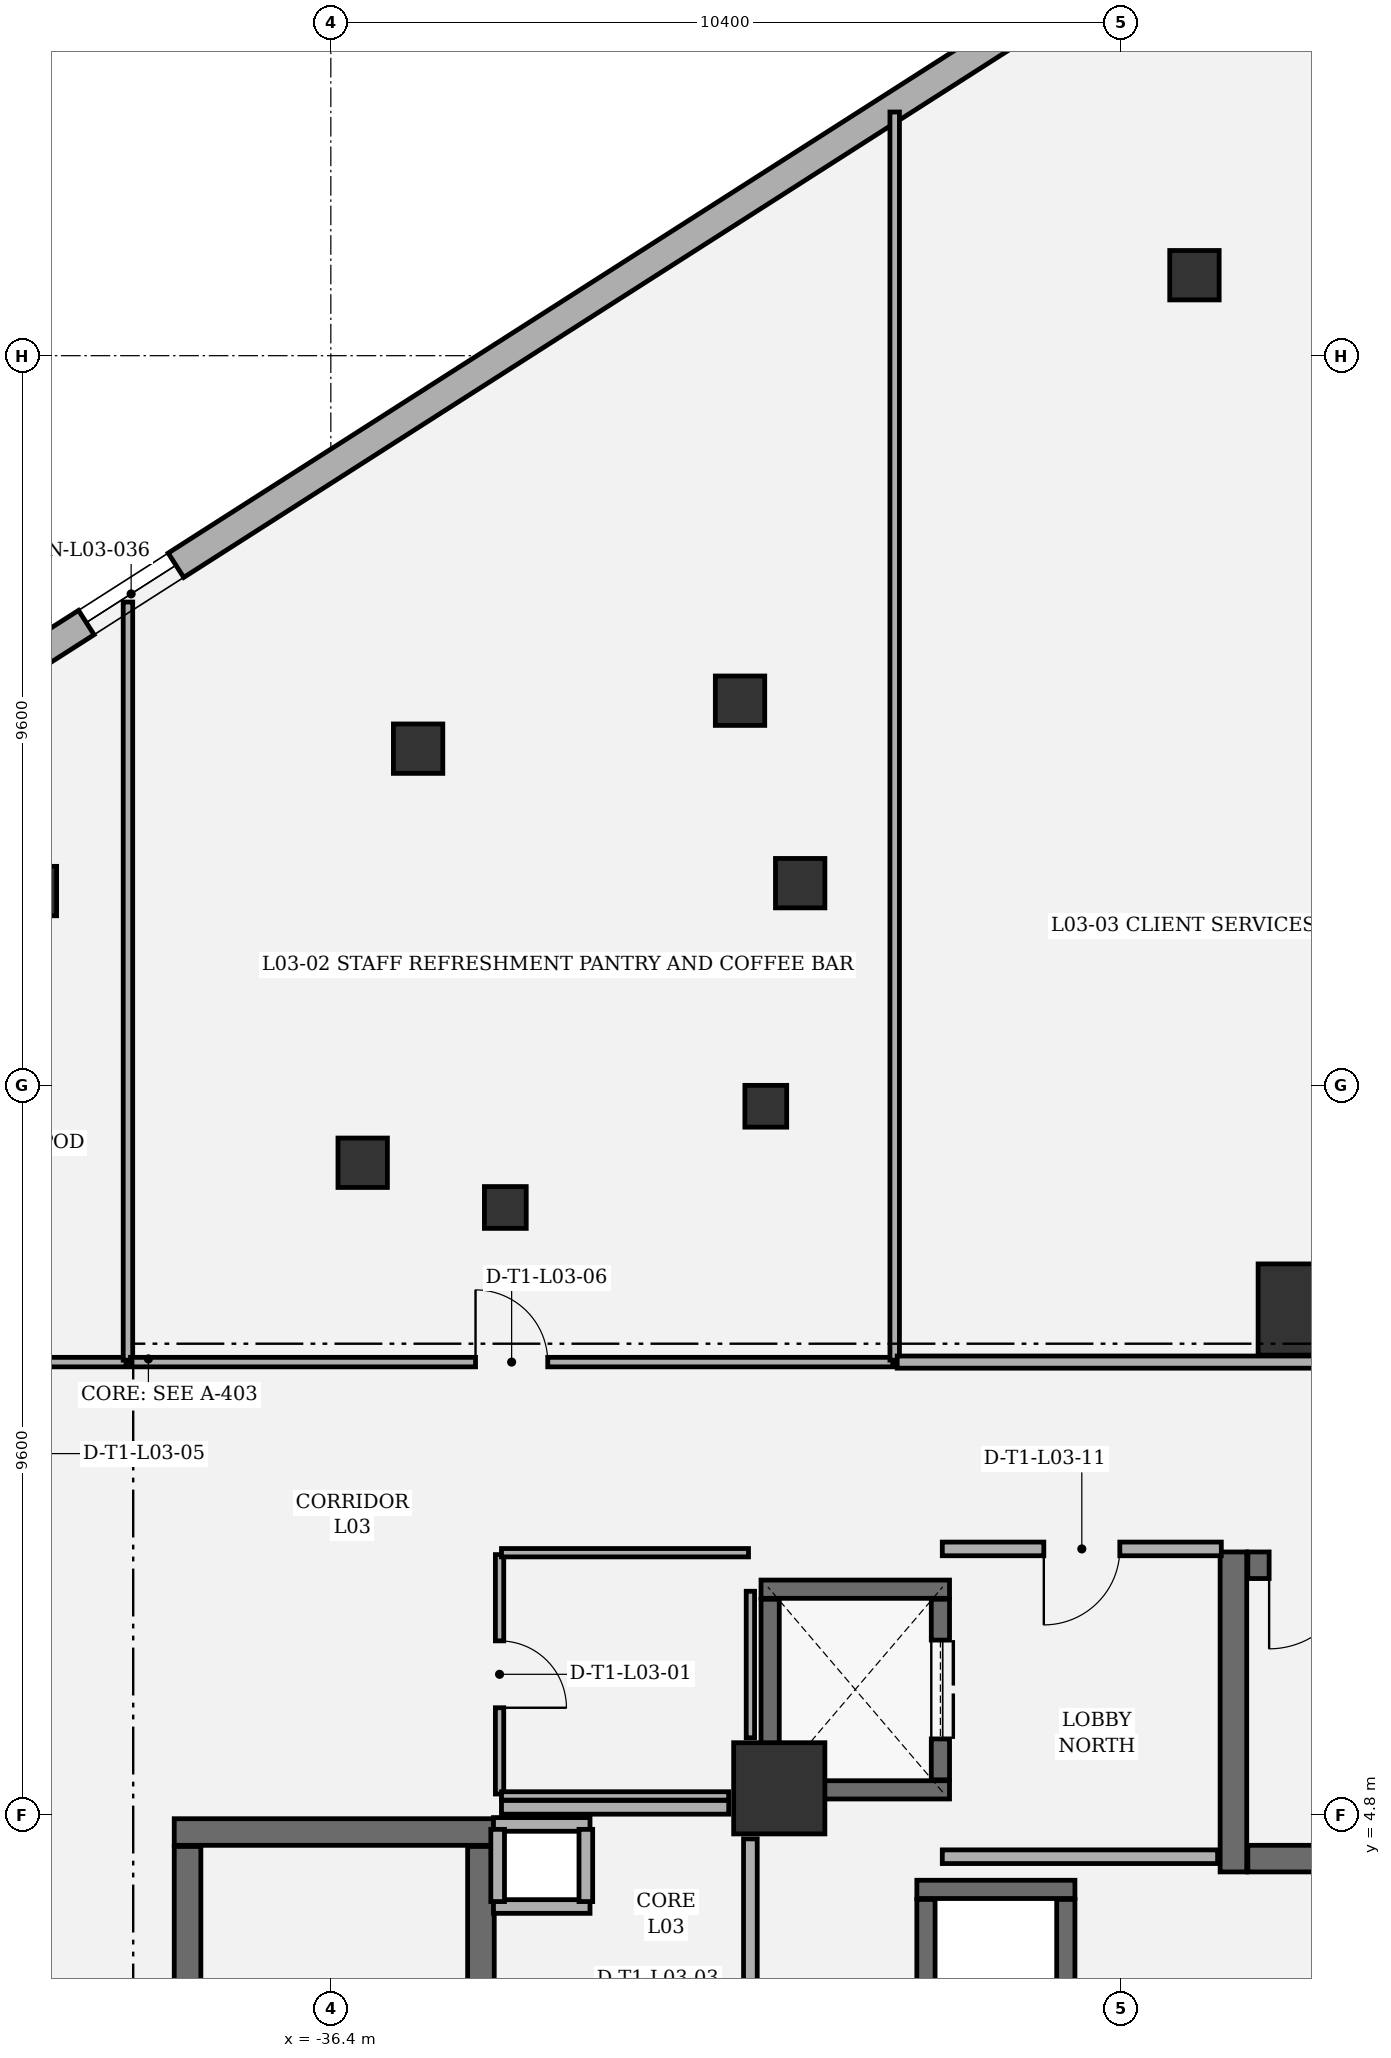
"""IFC4 building model, lengths in metres.
Left out: names, types, materials, properties, quantities, classifications, styles, units other than length and angle.
Written with IfcOpenShell. Run it as: python <this file> out.ifc"""

import sys

from ifc_helpers import new_model, si_unit, direction, frame, frame_2d, origin, origin_2d, place, context, subcontext, project, spatial, rectangle, extrude, element, fill, save


model = new_model("IFC4")
c1 = context("Model", 3, precision=1e-05, world=origin(), true_north=direction((0.0, 1.0)))
c2 = subcontext(c1, "Body", "Model", "MODEL_VIEW")
j1 = project(units=[si_unit("LENGTHUNIT", "METRE"), si_unit("PLANEANGLEUNIT", "RADIAN")], contexts=[c1])
p1 = place(None, origin())
s1 = spatial("IfcSite", under=j1, at=p1, CompositionType="ELEMENT")
p2 = place(p1, origin())
s2 = spatial("IfcBuilding", under=s1, at=p2, CompositionType="ELEMENT")
p3 = place(p2, frame((0.0, 0.0, 17.0)))
s3 = spatial("IfcBuildingStorey", under=s2, at=p3, CompositionType="ELEMENT", Elevation=17.0)
for number, where, z_axis, x_axis in (
    (1, (-23.6, 11.45, 0.0), (0.0, 0.0, 1.0), (1.0, 0.0, 0.0)),
    (2, (-30.5, 5.15, 0.0), (0.0, 0.0, 1.0), (1.0, 0.0, 0.0)),
):
    element("IfcColumn", number, at=place(p3, frame(where, z_axis=z_axis, x_axis=x_axis)), inside=s3, PredefinedType="COLUMN", context=c2, shape_type="SweptSolid", body=[
        extrude(rectangle(XDim=1.2, YDim=1.2, at=origin_2d()), origin(), (0.0, 0.0, 1.0), 5.0),
    ])
for number, where, z_axis, x_axis in (
    (3, (-40.333, 16.956, 0.0), (0.0, 0.0, 1.0), (1.0, 0.0, 0.0)),
    (4, (-35.252, 18.829, 0.0), (0.0, 0.0, 1.0), (1.0, 0.0, 0.0)),
    (5, (-25.038, 25.059, 0.0), (0.0, 0.0, 1.0), (1.0, 0.0, 0.0)),
    (6, (-31.016, 19.46, 0.0), (0.0, 0.0, 1.0), (1.0, 0.0, 0.0)),
    (7, (-35.981, 13.381, 0.0), (0.0, 0.0, 1.0), (1.0, 0.0, 0.0)),
    (8, (-30.225, 17.06, 0.0), (0.0, 0.0, 1.0), (1.0, 0.0, 0.0)),
):
    element("IfcColumn", number, at=place(p3, frame(where, z_axis=z_axis, x_axis=x_axis)), inside=s3, PredefinedType="COLUMN", context=c2, shape_type="SweptSolid", body=[
        extrude(rectangle(XDim=0.65, YDim=0.65, at=origin_2d()), origin(), (0.0, 0.0, 1.0), 5.0),
    ])
for number, where, z_axis, x_axis in (
    (9, (-34.104, 12.792, 0.0), (0.0, 0.0, 1.0), (1.0, 0.0, 0.0)),
    (10, (-30.677, 14.124, 0.0), (0.0, 0.0, 1.0), (1.0, 0.0, 0.0)),
):
    element("IfcColumn", number, at=place(p3, frame(where, z_axis=z_axis, x_axis=x_axis)), inside=s3, PredefinedType="COLUMN", context=c2, shape_type="SweptSolid", body=[
        extrude(rectangle(XDim=0.55, YDim=0.55, at=origin_2d()), origin(), (0.0, 0.0, 1.0), 5.0),
    ])
p4 = place(p3, frame((-64.419, 4.637, 0.0), z_axis=(0.0, 0.0, 1.0), x_axis=(0.842602364841, 0.538536214905, 0.0)))
e11 = element("IfcWall", 11, at=p4, inside=s3, PredefinedType="SOLIDWALL", context=c2, shape_type="SweptSolid", body=[
    extrude(rectangle(XDim=60.27, YDim=0.38, at=frame_2d((30.135, 0.0))), origin(), (0.0, 0.0, 1.0), 4.74),
])
p5 = place(p4, frame((29.435, 0.0, 0.8)))
e12 = element("IfcOpeningElement", 12, at=p5, cuts=e11, PredefinedType="OPENING", context=c2, shape_type="SweptSolid", body=[
    extrude(rectangle(XDim=1.4, YDim=1.5, at=frame_2d((0.7, 0.75))), frame((0.0, 0.2, 0.0), z_axis=(0.0, -1.0, 0.0), x_axis=(1.0, 0.0, 0.0)), (0.0, 0.0, 1.0), 0.4),
])
p6 = place(p3, frame((-24.525, 8.26, 0.0), z_axis=(0.0, 0.0, 1.0), x_axis=(0.0, -1.0, 0.0)))
e13 = element("IfcWall", 13, at=p6, inside=s3, PredefinedType="SHEAR", context=c2, shape_type="SweptSolid", body=[
    extrude(rectangle(XDim=4.21, YDim=0.35, at=frame_2d((2.105, 0.0))), origin(), (0.0, 0.0, 1.0), 4.74),
])
p7 = place(p3, frame((-24.335, 4.225, 0.0), z_axis=(0.0, 0.0, 1.0), x_axis=(1.0, 0.0, 0.0)))
e14 = element("IfcWall", 14, at=p7, inside=s3, PredefinedType="SHEAR", context=c2, shape_type="SweptSolid", body=[
    extrude(rectangle(XDim=8.12, YDim=0.35, at=frame_2d((4.06, 0.0))), origin(), (0.0, 0.0, 1.0), 4.74),
])
p8 = place(p3, frame((-16.215, 8.085, 0.0), z_axis=(0.0, 0.0, 1.0), x_axis=(-1.0, 0.0, 0.0)))
e15 = element("IfcWall", 15, at=p8, inside=s3, PredefinedType="SHEAR", context=c2, shape_type="SweptSolid", body=[
    extrude(rectangle(XDim=8.12, YDim=0.35, at=frame_2d((4.06, 0.0))), origin(), (0.0, 0.0, 1.0), 4.74),
])
p9 = place(p8, frame((6.74, 0.0, 0.0)))
e16 = element("IfcOpeningElement", 16, at=p9, cuts=e15, PredefinedType="OPENING", context=c2, shape_type="SweptSolid", body=[
    extrude(rectangle(XDim=1.1, YDim=2.2, at=frame_2d((0.55, 1.1))), frame((0.0, 0.185, 0.0), z_axis=(0.0, -1.0, 0.0), x_axis=(1.0, 0.0, 0.0)), (0.0, 0.0, 1.0), 0.37),
])
p10 = place(p3, frame((-34.25, 4.575, 0.0), z_axis=(0.0, 0.0, 1.0), x_axis=(-1.0, 0.0, 0.0)))
e17 = element("IfcWall", 17, at=p10, inside=s3, PredefinedType="SHEAR", context=c2, shape_type="SweptSolid", body=[
    extrude(rectangle(XDim=4.21, YDim=0.35, at=frame_2d((2.105, 0.0))), origin(), (0.0, 0.0, 1.0), 4.74),
])
for number, where, z_axis, x_axis in (
    (18, (-34.425, -4.385, 0.0), (0.0, 0.0, 1.0), (0.0, 1.0, 0.0)),
    (19, (-38.285, 4.385, 0.0), (0.0, 0.0, 1.0), (0.0, -1.0, 0.0)),
):
    element("IfcWall", number, at=place(p3, frame(where, z_axis=z_axis, x_axis=x_axis)), inside=s3, PredefinedType="SHEAR", context=c2, shape_type="SweptSolid", body=[
        extrude(rectangle(XDim=8.77, YDim=0.35, at=frame_2d((4.385, 0.0))), origin(), (0.0, 0.0, 1.0), 4.74),
    ])
for number, where, z_axis, x_axis in (
    (20, (-28.26, 5.13, 0.0), (0.0, 0.0, 1.0), (-1.0, 0.0, 0.0)),
    (21, (-30.74, 7.77, 0.0), (0.0, 0.0, 1.0), (1.0, 0.0, 0.0)),
):
    element("IfcWall", number, at=place(p3, frame(where, z_axis=z_axis, x_axis=x_axis)), inside=s3, PredefinedType="SHEAR", context=c2, shape_type="SweptSolid", body=[
        extrude(rectangle(XDim=2.48, YDim=0.24, at=frame_2d((1.24, 0.0))), origin(), (0.0, 0.0, 1.0), 4.74),
    ])
p11 = place(p3, frame((-30.62, 5.262, 0.0), z_axis=(0.0, 0.0, 1.0), x_axis=(0.0, 1.0, 0.0)))
e22 = element("IfcWall", 22, at=p11, inside=s3, PredefinedType="SHEAR", context=c2, shape_type="SweptSolid", body=[
    extrude(rectangle(XDim=2.376, YDim=0.24, at=frame_2d((1.188, 0.0))), origin(), (0.0, 0.0, 1.0), 4.74),
])
p12 = place(p3, frame((-28.38, 7.638, 0.0), z_axis=(0.0, 0.0, 1.0), x_axis=(0.0, -1.0, 0.0)))
e23 = element("IfcWall", 23, at=p12, inside=s3, PredefinedType="SHEAR", context=c2, shape_type="SweptSolid", body=[
    extrude(rectangle(XDim=2.376, YDim=0.24, at=frame_2d((1.188, 0.0))), origin(), (0.0, 0.0, 1.0), 4.74),
])
p13 = place(p12, frame((0.538, 0.0, 0.0)))
e24 = element("IfcOpeningElement", 24, at=p13, cuts=e23, PredefinedType="OPENING", context=c2, shape_type="SweptSolid", body=[
    extrude(rectangle(XDim=1.3, YDim=2.3, at=frame_2d((0.65, 1.15))), frame((0.0, 0.13, 0.0), z_axis=(0.0, -1.0, 0.0), x_axis=(1.0, 0.0, 0.0)), (0.0, 0.0, 1.0), 0.26),
])
p14 = place(p3, frame((-28.69, 3.82, 0.0), z_axis=(0.0, 0.0, 1.0), x_axis=(1.0, 0.0, 0.0)))
e25 = element("IfcWall", 25, at=p14, inside=s3, PredefinedType="SHEAR", context=c2, shape_type="SweptSolid", body=[
    extrude(rectangle(XDim=2.08, YDim=0.24, at=frame_2d((1.04, 0.0))), origin(), (0.0, 0.0, 1.0), 4.74),
])
for number, where, z_axis, x_axis in (
    (26, (-28.57, 1.562, 0.0), (0.0, 0.0, 1.0), (0.0, 1.0, 0.0)),
    (27, (-26.73, 3.688, 0.0), (0.0, 0.0, 1.0), (0.0, -1.0, 0.0)),
):
    element("IfcWall", number, at=place(p3, frame(where, z_axis=z_axis, x_axis=x_axis)), inside=s3, PredefinedType="SHEAR", context=c2, shape_type="SweptSolid", body=[
        extrude(rectangle(XDim=2.126, YDim=0.24, at=frame_2d((1.063, 0.0))), origin(), (0.0, 0.0, 1.0), 4.74),
    ])
for number, where, z_axis, x_axis in (
    (28, (-32.99, 3.595, 0.0), (0.0, 0.0, 1.0), (-1.0, 0.0, 0.0)),
    (29, (-34.26, 4.675, 0.0), (0.0, 0.0, 1.0), (1.0, 0.0, 0.0)),
):
    element("IfcWall", number, at=place(p3, frame(where, z_axis=z_axis, x_axis=x_axis)), inside=s3, PredefinedType="PARTITIONING", context=c2, shape_type="SweptSolid", body=[
        extrude(rectangle(XDim=1.27, YDim=0.18, at=frame_2d((0.635, 0.0))), origin(), (0.0, 0.0, 1.0), 4.74),
    ])
for number, where, z_axis, x_axis in (
    (30, (-34.205, 3.66, 0.0), (0.0, 0.0, 1.0), (0.0, 1.0, 0.0)),
    (31, (-33.045, 4.61, 0.0), (0.0, 0.0, 1.0), (0.0, -1.0, 0.0)),
):
    element("IfcWall", number, at=place(p3, frame(where, z_axis=z_axis, x_axis=x_axis)), inside=s3, PredefinedType="PARTITIONING", context=c2, shape_type="SweptSolid", body=[
        extrude(rectangle(XDim=0.95, YDim=0.18, at=frame_2d((0.475, 0.0))), origin(), (0.0, 0.0, 1.0), 4.74),
    ])
p15 = place(p3, frame((-28.355, 4.25, 0.0), z_axis=(0.0, 0.0, 1.0), x_axis=(1.0, 0.0, 0.0)))
e32 = element("IfcWall", 32, at=p15, inside=s3, PredefinedType="PARTITIONING", context=c2, shape_type="SweptSolid", body=[
    extrude(rectangle(XDim=3.622, YDim=0.18, at=frame_2d((1.811, 0.0))), origin(), (0.0, 0.0, 1.0), 4.74),
])
p16 = place(p3, frame((-24.684, 8.3, 0.0), z_axis=(0.0, 0.0, 1.0), x_axis=(-1.0, 0.0, 0.0)))
e33 = element("IfcWall", 33, at=p16, inside=s3, PredefinedType="PARTITIONING", context=c2, shape_type="SweptSolid", body=[
    extrude(rectangle(XDim=3.671, YDim=0.18, at=frame_2d((1.835, 0.0))), origin(), (0.0, 0.0, 1.0), 4.253),
])
p17 = place(p16, frame((1.335, 0.0, 0.0)))
e34 = element("IfcOpeningElement", 34, at=p17, cuts=e33, PredefinedType="OPENING", context=c2, shape_type="SweptSolid", body=[
    extrude(rectangle(XDim=1.0, YDim=2.15, at=frame_2d((0.5, 1.075))), frame((0.0, 0.1, 0.0), z_axis=(0.0, -1.0, 0.0), x_axis=(1.0, 0.0, 0.0)), (0.0, 0.0, 1.0), 0.2),
])
p18 = place(p3, frame((-34.18, 8.225, 0.0), z_axis=(0.0, 0.0, 1.0), x_axis=(0.0, -1.0, 0.0)))
e35 = element("IfcWall", 35, at=p18, inside=s3, PredefinedType="PARTITIONING", context=c2, shape_type="SweptSolid", body=[
    extrude(rectangle(XDim=3.15, YDim=0.11, at=frame_2d((1.575, 0.0))), origin(), (0.0, 0.0, 1.0), 4.74),
])
p19 = place(p18, frame((1.135, 0.0, 0.0)))
e36 = element("IfcOpeningElement", 36, at=p19, cuts=e35, PredefinedType="OPENING", context=c2, shape_type="SweptSolid", body=[
    extrude(rectangle(XDim=0.88, YDim=2.1, at=frame_2d((0.44, 1.05))), frame((0.0, 0.065, 0.0), z_axis=(0.0, -1.0, 0.0), x_axis=(1.0, 0.0, 0.0)), (0.0, 0.0, 1.0), 0.13),
])
p20 = place(p3, frame((-34.155, 5.05, 0.0), z_axis=(0.0, 0.0, 1.0), x_axis=(1.0, 0.0, 0.0)))
e37 = element("IfcWall", 37, at=p20, inside=s3, PredefinedType="PARTITIONING", context=c2, shape_type="SweptSolid", body=[
    extrude(rectangle(XDim=2.99, YDim=0.11, at=frame_2d((1.495, 0.0))), origin(), (0.0, 0.0, 1.0), 4.74),
])
p21 = place(p3, frame((-30.88, 5.815, 0.0), z_axis=(0.0, 0.0, 1.0), x_axis=(0.0, 1.0, 0.0)))
e38 = element("IfcWall", 38, at=p21, inside=s3, PredefinedType="PARTITIONING", context=c2, shape_type="SweptSolid", body=[
    extrude(rectangle(XDim=1.928, YDim=0.11, at=frame_2d((0.964, 0.0))), origin(), (0.0, 0.0, 1.0), 4.74),
])
p22 = place(p3, frame((-30.905, 8.25, 0.0), z_axis=(0.0, 0.0, 1.0), x_axis=(-1.0, 0.0, 0.0)))
e39 = element("IfcWall", 39, at=p22, inside=s3, PredefinedType="PARTITIONING", context=c2, shape_type="SweptSolid", body=[
    extrude(rectangle(XDim=3.25, YDim=0.11, at=frame_2d((1.625, 0.0))), origin(), (0.0, 0.0, 1.0), 4.253),
])
p23 = place(p3, frame((-30.88, 1.625, 0.0), z_axis=(0.0, 0.0, 1.0), x_axis=(0.0, 1.0, 0.0)))
e40 = element("IfcWall", 40, at=p23, inside=s3, PredefinedType="PARTITIONING", context=c2, shape_type="SweptSolid", body=[
    extrude(rectangle(XDim=2.86, YDim=0.18, at=frame_2d((1.43, 0.0))), origin(), (0.0, 0.0, 1.0), 4.74),
])
p24 = place(p3, frame((-31.165, 4.9, 0.0), z_axis=(0.0, 0.0, 1.0), x_axis=(-1.0, 0.0, 0.0)))
e41 = element("IfcWall", 41, at=p24, inside=s3, PredefinedType="PARTITIONING", context=c2, shape_type="SweptSolid", body=[
    extrude(rectangle(XDim=2.99, YDim=0.18, at=frame_2d((1.495, 0.0))), origin(), (0.0, 0.0, 1.0), 4.74),
])
p25 = place(p3, frame((-40.633, 10.758, 0.0), z_axis=(0.0, 0.0, 1.0), x_axis=(1.0, 0.0, 0.0)))
e42 = element("IfcWall", 42, at=p25, inside=s3, PredefinedType="PARTITIONING", context=c2, shape_type="SweptSolid", body=[
    extrude(rectangle(XDim=1.539, YDim=0.125, at=frame_2d((0.77, 0.0))), origin(), (0.0, 0.0, 1.0), 4.74),
])
p26 = place(p3, frame((-39.069, 10.783, 0.0), z_axis=(0.0, 0.0, 1.0), x_axis=(0.0, 1.0, 0.0)))
e43 = element("IfcWall", 43, at=p26, inside=s3, PredefinedType="PARTITIONING", context=c2, shape_type="SweptSolid", body=[
    extrude(rectangle(XDim=9.976, YDim=0.125, at=frame_2d((4.988, 0.0))), origin(), (0.0, 0.0, 1.0), 4.74),
])
p27 = place(p3, frame((-39.036, 10.758, 0.0), z_axis=(0.0, 0.0, 1.0), x_axis=(1.0, 0.0, 0.0)))
e44 = element("IfcWall", 44, at=p27, inside=s3, PredefinedType="PARTITIONING", context=c2, shape_type="SweptSolid", body=[
    extrude(rectangle(XDim=10.03, YDim=0.125, at=frame_2d((5.015, 0.0))), origin(), (0.0, 0.0, 1.0), 4.253),
])
p28 = place(p27, frame((4.54, 0.0, 0.0)))
e45 = element("IfcOpeningElement", 45, at=p28, cuts=e44, PredefinedType="OPENING", context=c2, shape_type="SweptSolid", body=[
    extrude(rectangle(XDim=0.95, YDim=2.15, at=frame_2d((0.475, 1.075))), frame((0.0, 0.073, 0.0), z_axis=(0.0, -1.0, 0.0), x_axis=(1.0, 0.0, 0.0)), (0.0, 0.0, 1.0), 0.145),
])
p29 = place(p3, frame((-28.981, 10.783, 0.0), z_axis=(0.0, 0.0, 1.0), x_axis=(0.0, 1.0, 0.0)))
e46 = element("IfcWall", 46, at=p29, inside=s3, PredefinedType="PARTITIONING", context=c2, shape_type="SweptSolid", body=[
    extrude(rectangle(XDim=16.423, YDim=0.125, at=frame_2d((8.211, 0.0))), origin(), (0.0, 0.0, 1.0), 4.74),
])
p30 = place(p3, frame((-28.948, 10.758, 0.0), z_axis=(0.0, 0.0, 1.0), x_axis=(1.0, 0.0, 0.0)))
e47 = element("IfcWall", 47, at=p30, inside=s3, PredefinedType="PARTITIONING", context=c2, shape_type="SweptSolid", body=[
    extrude(rectangle(XDim=12.535, YDim=0.16, at=frame_2d((6.268, 0.0))), origin(), (0.0, 0.0, 1.0), 4.74),
])
p31 = place(p30, frame((6.534, 0.0, 0.0)))
e48 = element("IfcOpeningElement", 48, at=p31, cuts=e47, PredefinedType="OPENING", context=c2, shape_type="SweptSolid", body=[
    extrude(rectangle(XDim=1.1, YDim=2.15, at=frame_2d((0.55, 1.075))), frame((0.0, 0.09, 0.0), z_axis=(0.0, -1.0, 0.0), x_axis=(1.0, 0.0, 0.0)), (0.0, 0.0, 1.0), 0.18),
])
p32 = place(p5, origin())
e49 = element("IfcWindow", 49, at=p32, inside=s3, PartitioningType="SINGLE_PANEL", PredefinedType="WINDOW", context=c2, shape_type="SweptSolid", body=[
    extrude(rectangle(XDim=1.4, YDim=1.5, at=frame_2d((0.7, 0.75))), frame((0.0, 0.03, 0.0), z_axis=(0.0, -1.0, 0.0), x_axis=(1.0, 0.0, 0.0)), (0.0, 0.0, 1.0), 0.06),
])
fill(e12, e49)
p33 = place(p9, origin())
e50 = element("IfcDoor", 50, at=p33, inside=s3, OperationType="SINGLE_SWING_RIGHT", PredefinedType="DOOR", context=c2, shape_type="SweptSolid", body=[
    extrude(rectangle(XDim=1.1, YDim=2.2, at=frame_2d((0.55, 1.1))), frame((0.0, 0.025, 0.0), z_axis=(0.0, -1.0, 0.0), x_axis=(1.0, 0.0, 0.0)), (0.0, 0.0, 1.0), 0.05),
])
fill(e16, e50)
p34 = place(p13, origin())
e51 = element("IfcDoor", 51, at=p34, inside=s3, OperationType="DOUBLE_DOOR_SLIDING", PredefinedType="DOOR", context=c2, shape_type="SweptSolid", body=[
    extrude(rectangle(XDim=1.3, YDim=2.3, at=frame_2d((0.65, 1.15))), frame((0.0, 0.025, 0.0), z_axis=(0.0, -1.0, 0.0), x_axis=(1.0, 0.0, 0.0)), (0.0, 0.0, 1.0), 0.05),
])
fill(e24, e51)
p35 = place(p19, origin())
e52 = element("IfcDoor", 52, at=p35, inside=s3, OperationType="SINGLE_SWING_RIGHT", PredefinedType="DOOR", context=c2, shape_type="SweptSolid", body=[
    extrude(rectangle(XDim=0.88, YDim=2.1, at=frame_2d((0.44, 1.05))), frame((0.0, 0.025, 0.0), z_axis=(0.0, -1.0, 0.0), x_axis=(1.0, 0.0, 0.0)), (0.0, 0.0, 1.0), 0.05),
])
fill(e36, e52)
p36 = place(p28, origin())
e53 = element("IfcDoor", 53, at=p36, inside=s3, OperationType="SINGLE_SWING_LEFT", PredefinedType="DOOR", context=c2, shape_type="SweptSolid", body=[
    extrude(rectangle(XDim=0.95, YDim=2.15, at=frame_2d((0.475, 1.075))), frame((0.0, 0.025, 0.0), z_axis=(0.0, -1.0, 0.0), x_axis=(1.0, 0.0, 0.0)), (0.0, 0.0, 1.0), 0.05),
])
fill(e45, e53)
p37 = place(p17, origin())
e54 = element("IfcDoor", 54, at=p37, inside=s3, OperationType="SINGLE_SWING_RIGHT", PredefinedType="DOOR", context=c2, shape_type="SweptSolid", body=[
    extrude(rectangle(XDim=1.0, YDim=2.15, at=frame_2d((0.5, 1.075))), frame((0.0, 0.025, 0.0), z_axis=(0.0, -1.0, 0.0), x_axis=(1.0, 0.0, 0.0)), (0.0, 0.0, 1.0), 0.05),
])
fill(e34, e54)
save(model, sys.argv[1])
